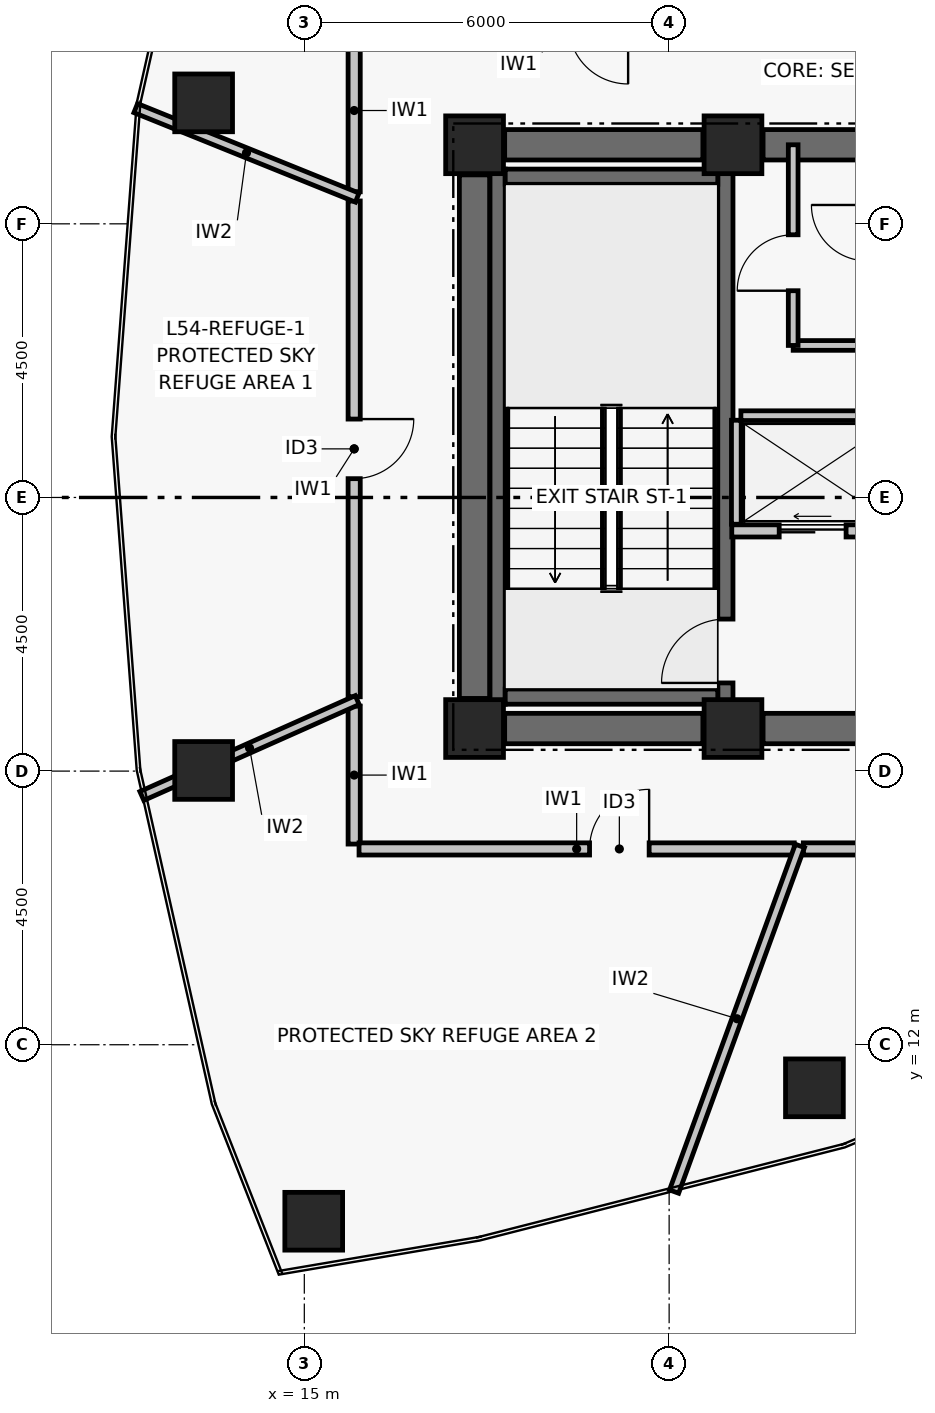
"""IFC4 building model, lengths in metres.
Left out: names, types, materials, properties, quantities, classifications, styles, units other than length and angle.
Written with IfcOpenShell. Run it as: python <this file> out.ifc"""

import sys

from ifc_helpers import new_model, si_unit, direction, frame, frame_2d, origin, origin_2d, place, context, subcontext, project, spatial, rectangle, hollow_rectangle, extrude, element, fill, save


model = new_model("IFC4")
c1 = context("Model", 3, precision=1e-05, world=origin(), true_north=direction((0.0, 1.0)))
c2 = subcontext(c1, "Body", "Model", "MODEL_VIEW")
j1 = project(units=[si_unit("LENGTHUNIT", "METRE"), si_unit("PLANEANGLEUNIT", "RADIAN")], contexts=[c1])
p1 = place(None, origin())
s1 = spatial("IfcSite", under=j1, at=p1, CompositionType="ELEMENT")
p2 = place(p1, origin())
s2 = spatial("IfcBuilding", under=s1, at=p2, CompositionType="ELEMENT")
p3 = place(p2, frame((0.0, 0.0, 213.84)))
s3 = spatial("IfcBuildingStorey", under=s2, at=p3, CompositionType="ELEMENT", Elevation=213.84)
for number, where, z_axis, x_axis in (
    (1, (17.8, 17.2, 0.0), (0.0, 0.0, 1.0), (1.0, 0.0, 0.0)),
    (2, (22.05, 17.2, 0.0), (0.0, 0.0, 1.0), (1.0, 0.0, 0.0)),
    (3, (17.8, 26.8, 0.0), (0.0, 0.0, 1.0), (1.0, 0.0, 0.0)),
    (4, (22.05, 26.8, 0.0), (0.0, 0.0, 1.0), (1.0, 0.0, 0.0)),
):
    element("IfcColumn", number, at=place(p3, frame(where, z_axis=z_axis, x_axis=x_axis)), inside=s3, PredefinedType="COLUMN", context=c2, shape_type="SweptSolid", body=[
        extrude(rectangle(XDim=0.95, YDim=0.95, at=origin_2d()), origin(), (0.0, 0.0, 1.0), 5.7),
    ])
p4 = place(p3, frame((18.295, 17.2, 0.0), z_axis=(0.0, 0.0, 1.0), x_axis=(1.0, 0.0, 0.0)))
e5 = element("IfcWall", 5, at=p4, inside=s3, PredefinedType="SHEAR", context=c2, shape_type="SweptSolid", body=[
    extrude(rectangle(XDim=3.26, YDim=0.5, at=frame_2d((1.63, 0.0))), origin(), (0.0, 0.0, 1.0), 5.48),
])
p5 = place(p3, frame((22.545, 17.2, 0.0), z_axis=(0.0, 0.0, 1.0), x_axis=(1.0, 0.0, 0.0)))
e6 = element("IfcWall", 6, at=p5, inside=s3, PredefinedType="SHEAR", context=c2, shape_type="SweptSolid", body=[
    extrude(rectangle(XDim=1.805, YDim=0.5, at=frame_2d((0.903, 0.0))), origin(), (0.0, 0.0, 1.0), 5.48),
])
p6 = place(p3, frame((18.295, 26.8, 0.0), z_axis=(0.0, 0.0, 1.0), x_axis=(1.0, 0.0, 0.0)))
e7 = element("IfcWall", 7, at=p6, inside=s3, PredefinedType="SHEAR", context=c2, shape_type="SweptSolid", body=[
    extrude(rectangle(XDim=3.26, YDim=0.5, at=frame_2d((1.63, 0.0))), origin(), (0.0, 0.0, 1.0), 5.48),
])
p7 = place(p3, frame((22.545, 26.8, 0.0), z_axis=(0.0, 0.0, 1.0), x_axis=(1.0, 0.0, 0.0)))
e8 = element("IfcWall", 8, at=p7, inside=s3, PredefinedType="SHEAR", context=c2, shape_type="SweptSolid", body=[
    extrude(rectangle(XDim=1.805, YDim=0.5, at=frame_2d((0.903, 0.0))), origin(), (0.0, 0.0, 1.0), 5.48),
])
p8 = place(p3, frame((17.8, 17.695, 0.0), z_axis=(0.0, 0.0, 1.0), x_axis=(0.0, 1.0, 0.0)))
e9 = element("IfcWall", 9, at=p8, inside=s3, PredefinedType="SHEAR", context=c2, shape_type="SweptSolid", body=[
    extrude(rectangle(XDim=8.61, YDim=0.5, at=frame_2d((4.305, 0.0))), origin(), (0.0, 0.0, 1.0), 5.48),
])
p9 = place(p3, frame((18.179, 17.6, 0.0), z_axis=(0.0, 0.0, 1.0), x_axis=(0.0, 1.0, 0.0)))
e10 = element("IfcWall", 10, at=p9, inside=s3, PredefinedType="SHEAR", context=c2, shape_type="SweptSolid", body=[
    extrude(rectangle(XDim=8.8, YDim=0.25, at=frame_2d((4.4, 0.0))), origin(), (0.0, 0.0, 1.0), 5.48),
])
p10 = place(p3, frame((21.925, 17.6, 0.0), z_axis=(0.0, 0.0, 1.0), x_axis=(0.0, 1.0, 0.0)))
e11 = element("IfcWall", 11, at=p10, inside=s3, PredefinedType="SHEAR", context=c2, shape_type="SweptSolid", body=[
    extrude(rectangle(XDim=8.8, YDim=0.25, at=frame_2d((4.4, 0.0))), origin(), (0.0, 0.0, 1.0), 5.48),
])
p11 = place(p10, frame((0.35, 0.0, 0.0)))
e12 = element("IfcOpeningElement", 12, at=p11, cuts=e11, PredefinedType="OPENING", context=c2, shape_type="SweptSolid", body=[
    extrude(rectangle(XDim=1.05, YDim=2.08, at=frame_2d((0.525, 1.04))), frame((0.0, 0.135, 0.0), z_axis=(0.0, -1.0, 0.0), x_axis=(1.0, 0.0, 0.0)), (0.0, 0.0, 1.0), 0.27),
])
for number, where, z_axis, x_axis in (
    (13, (18.304, 17.725, 0.0), (0.0, 0.0, 1.0), (1.0, 0.0, 0.0)),
    (14, (18.304, 26.275, 0.0), (0.0, 0.0, 1.0), (1.0, 0.0, 0.0)),
):
    element("IfcWall", number, at=place(p3, frame(where, z_axis=z_axis, x_axis=x_axis)), inside=s3, PredefinedType="SHEAR", context=c2, shape_type="SweptSolid", body=[
        extrude(rectangle(XDim=3.496, YDim=0.25, at=frame_2d((1.748, 0.0))), origin(), (0.0, 0.0, 1.0), 5.48),
    ])
for number, where, z_axis, x_axis in (
    (15, (13.344, 27.489, 0.0), (0.0, 0.0, 1.0), (1.0, 0.0, 0.0)),
    (16, (13.344, 16.511, 0.0), (0.0, 0.0, 1.0), (1.0, 0.0, 0.0)),
    (17, (15.155, 9.097, 0.0), (0.0, 0.0, 1.0), (1.0, 0.0, 0.0)),
    (18, (23.389, 11.292, 0.0), (0.0, 0.0, 1.0), (1.0, 0.0, 0.0)),
):
    element("IfcColumn", number, at=place(p3, frame(where, z_axis=z_axis, x_axis=x_axis)), inside=s3, PredefinedType="COLUMN", context=c2, shape_type="SweptSolid", body=[
        extrude(hollow_rectangle(XDim=0.95, YDim=0.95, WallThickness=0.04, at=origin_2d()), origin(), (0.0, 0.0, 1.0), 5.7),
    ])
p12 = place(p3, frame((22.03, 20.45, 0.0), z_axis=(0.0, 0.0, 1.0), x_axis=(1.0, 0.0, 0.0)))
e19 = element("IfcWall", 19, at=p12, inside=s3, PredefinedType="PARTITIONING", context=c2, shape_type="SweptSolid", body=[
    extrude(rectangle(XDim=2.8, YDim=0.2, at=frame_2d((1.4, 0.0))), origin(), (0.0, 0.0, 1.0), 5.48),
])
p13 = place(p12, frame((0.78, 0.0, 0.0)))
e20 = element("IfcOpeningElement", 20, at=p13, cuts=e19, PredefinedType="OPENING", context=c2, shape_type="SweptSolid", body=[
    extrude(rectangle(XDim=1.1, YDim=2.08, at=frame_2d((0.55, 1.04))), frame((0.0, 0.11, 0.0), z_axis=(0.0, -1.0, 0.0), x_axis=(1.0, 0.0, 0.0)), (0.0, 0.0, 1.0), 0.22),
])
p14 = place(p3, frame((22.105, 20.56, 0.0), z_axis=(0.0, 0.0, 1.0), x_axis=(0.0, 1.0, 0.0)))
e21 = element("IfcWall", 21, at=p14, inside=s3, PredefinedType="PARTITIONING", context=c2, shape_type="SweptSolid", body=[
    extrude(rectangle(XDim=1.71, YDim=0.16, at=frame_2d((0.855, 0.0))), origin(), (0.0, 0.0, 1.0), 5.48),
])
p15 = place(p3, frame((22.18, 22.345, 0.0), z_axis=(0.0, 0.0, 1.0), x_axis=(1.0, 0.0, 0.0)))
e22 = element("IfcWall", 22, at=p15, inside=s3, PredefinedType="PARTITIONING", context=c2, shape_type="SweptSolid", body=[
    extrude(rectangle(XDim=2.65, YDim=0.16, at=frame_2d((1.325, 0.0))), origin(), (0.0, 0.0, 1.0), 5.48),
])
p16 = place(p3, frame((23.04, 23.5, 0.0), z_axis=(0.0, 0.0, 1.0), x_axis=(1.0, 0.0, 0.0)))
e23 = element("IfcWall", 23, at=p16, inside=s3, PredefinedType="PARTITIONING", context=c2, shape_type="SweptSolid", body=[
    extrude(rectangle(XDim=1.7, YDim=0.16, at=frame_2d((0.85, 0.0))), origin(), (0.0, 0.0, 1.0), 5.48),
])
p17 = place(p3, frame((23.04, 23.5, 0.0), z_axis=(0.0, 0.0, 1.0), x_axis=(0.0, 1.0, 0.0)))
e24 = element("IfcWall", 24, at=p17, inside=s3, PredefinedType="PARTITIONING", context=c2, shape_type="SweptSolid", body=[
    extrude(rectangle(XDim=3.3, YDim=0.16, at=frame_2d((1.65, 0.0))), origin(), (0.0, 0.0, 1.0), 4.61),
])
p18 = place(p17, frame((0.9, 0.0, 0.0)))
e25 = element("IfcOpeningElement", 25, at=p18, cuts=e24, PredefinedType="OPENING", context=c2, shape_type="SweptSolid", body=[
    extrude(rectangle(XDim=0.92, YDim=2.05, at=frame_2d((0.46, 1.025))), frame((0.0, 0.09, 0.0), z_axis=(0.0, -1.0, 0.0), x_axis=(1.0, 0.0, 0.0)), (0.0, 0.0, 1.0), 0.18),
])
p19 = place(p3, frame((15.82, 25.876, 0.0), z_axis=(0.0, 0.0, 1.0), x_axis=(0.0, -1.0, 0.0)))
e26 = element("IfcWall", 26, at=p19, inside=s3, PredefinedType="PARTITIONING", context=c2, shape_type="SweptSolid", body=[
    extrude(rectangle(XDim=8.154, YDim=0.2, at=frame_2d((4.077, 0.0))), origin(), (0.0, 0.0, 1.0), 5.48),
])
p20 = place(p19, frame((3.587, 0.0, 0.0)))
e27 = element("IfcOpeningElement", 27, at=p20, cuts=e26, PredefinedType="OPENING", context=c2, shape_type="SweptSolid", body=[
    extrude(rectangle(XDim=0.98, YDim=2.06, at=frame_2d((0.49, 1.03))), frame((0.0, 0.11, 0.0), z_axis=(0.0, -1.0, 0.0), x_axis=(1.0, 0.0, 0.0)), (0.0, 0.0, 1.0), 0.22),
])
p21 = place(p3, frame((15.82, 17.569, 0.0), z_axis=(0.0, 0.0, 1.0), x_axis=(0.0, -1.0, 0.0)))
e28 = element("IfcWall", 28, at=p21, inside=s3, PredefinedType="PARTITIONING", context=c2, shape_type="SweptSolid", body=[
    extrude(rectangle(XDim=2.269, YDim=0.2, at=frame_2d((1.135, 0.0))), origin(), (0.0, 0.0, 1.0), 4.71),
])
p22 = place(p3, frame((15.9, 15.22, 0.0), z_axis=(0.0, 0.0, 1.0), x_axis=(1.0, 0.0, 0.0)))
e29 = element("IfcWall", 29, at=p22, inside=s3, PredefinedType="PARTITIONING", context=c2, shape_type="SweptSolid", body=[
    extrude(rectangle(XDim=7.158, YDim=0.2, at=frame_2d((3.579, 0.0))), origin(), (0.0, 0.0, 1.0), 4.71),
])
p23 = place(p22, frame((3.791, 0.0, 0.0)))
e30 = element("IfcOpeningElement", 30, at=p23, cuts=e29, PredefinedType="OPENING", context=c2, shape_type="SweptSolid", body=[
    extrude(rectangle(XDim=0.98, YDim=2.06, at=frame_2d((0.49, 1.03))), frame((0.0, 0.11, 0.0), z_axis=(0.0, -1.0, 0.0), x_axis=(1.0, 0.0, 0.0)), (0.0, 0.0, 1.0), 0.22),
])
p24 = place(p3, frame((23.207, 15.22, 0.0), z_axis=(0.0, 0.0, 1.0), x_axis=(1.0, 0.0, 0.0)))
e31 = element("IfcWall", 31, at=p24, inside=s3, PredefinedType="PARTITIONING", context=c2, shape_type="SweptSolid", body=[
    extrude(rectangle(XDim=5.622, YDim=0.2, at=frame_2d((2.811, 0.0))), origin(), (0.0, 0.0, 1.0), 5.48),
])
p25 = place(p24, frame((1.811, 0.0, 0.0)))
e32 = element("IfcOpeningElement", 32, at=p25, cuts=e31, PredefinedType="OPENING", context=c2, shape_type="SweptSolid", body=[
    extrude(rectangle(XDim=0.98, YDim=2.06, at=frame_2d((0.49, 1.03))), frame((0.0, 0.11, 0.0), z_axis=(0.0, -1.0, 0.0), x_axis=(1.0, 0.0, 0.0)), (0.0, 0.0, 1.0), 0.22),
])
p26 = place(p3, frame((15.82, 28.7, 0.0), z_axis=(0.0, 0.0, 1.0), x_axis=(0.0, -1.0, 0.0)))
e33 = element("IfcWall", 33, at=p26, inside=s3, PredefinedType="PARTITIONING", context=c2, shape_type="SweptSolid", body=[
    extrude(rectangle(XDim=2.673, YDim=0.2, at=frame_2d((1.336, 0.0))), origin(), (0.0, 0.0, 1.0), 4.71),
])
p27 = place(p3, frame((15.87, 25.931, 0.0), z_axis=(0.0, 0.0, 1.0), x_axis=(-0.927185393296, 0.374602784905, 0.0)))
e34 = element("IfcWall", 34, at=p27, inside=s3, PredefinedType="PARTITIONING", context=c2, shape_type="SweptSolid", body=[
    extrude(rectangle(XDim=3.929, YDim=0.16, at=frame_2d((1.964, 0.0))), origin(), (0.0, 0.0, 1.0), 4.91),
])
p28 = place(p3, frame((15.87, 17.668, 0.0), z_axis=(0.0, 0.0, 1.0), x_axis=(-0.913554296234, -0.406716790693, 0.0)))
e35 = element("IfcWall", 35, at=p28, inside=s3, PredefinedType="PARTITIONING", context=c2, shape_type="SweptSolid", body=[
    extrude(rectangle(XDim=3.877, YDim=0.16, at=frame_2d((1.938, 0.0))), origin(), (0.0, 0.0, 1.0), 4.71),
])
p29 = place(p3, frame((23.15, 15.27, 0.0), z_axis=(0.0, 0.0, 1.0), x_axis=(-0.342018471851, -0.939693229151, 0.0)))
e36 = element("IfcWall", 36, at=p29, inside=s3, PredefinedType="PARTITIONING", context=c2, shape_type="SweptSolid", body=[
    extrude(rectangle(XDim=6.05, YDim=0.16, at=frame_2d((3.025, 0.0))), origin(), (0.0, 0.0, 1.0), 4.71),
])
p30 = place(p11, origin())
e37 = element("IfcDoor", 37, at=p30, inside=s3, OperationType="SINGLE_SWING_LEFT", PredefinedType="DOOR", context=c2, shape_type="SweptSolid", body=[
    extrude(rectangle(XDim=1.05, YDim=2.08, at=frame_2d((0.525, 1.04))), frame((0.0, 0.025, 0.0), z_axis=(0.0, -1.0, 0.0), x_axis=(1.0, 0.0, 0.0)), (0.0, 0.0, 1.0), 0.05),
])
fill(e12, e37)
p31 = place(p13, origin())
e38 = element("IfcDoor", 38, at=p31, inside=s3, OperationType="DOUBLE_DOOR_SLIDING", PredefinedType="DOOR", context=c2, shape_type="SweptSolid", body=[
    extrude(rectangle(XDim=1.1, YDim=2.08, at=frame_2d((0.55, 1.04))), frame((0.0, 0.025, 0.0), z_axis=(0.0, -1.0, 0.0), x_axis=(1.0, 0.0, 0.0)), (0.0, 0.0, 1.0), 0.05),
])
fill(e20, e38)
p32 = place(p18, origin())
e39 = element("IfcDoor", 39, at=p32, inside=s3, OperationType="SINGLE_SWING_LEFT", PredefinedType="DOOR", context=c2, shape_type="SweptSolid", body=[
    extrude(rectangle(XDim=0.92, YDim=2.05, at=frame_2d((0.46, 1.025))), frame((0.0, 0.025, 0.0), z_axis=(0.0, -1.0, 0.0), x_axis=(1.0, 0.0, 0.0)), (0.0, 0.0, 1.0), 0.05),
])
fill(e25, e39)
p33 = place(p20, origin())
e40 = element("IfcDoor", 40, at=p33, inside=s3, OperationType="SINGLE_SWING_LEFT", PredefinedType="DOOR", context=c2, shape_type="SweptSolid", body=[
    extrude(rectangle(XDim=0.98, YDim=2.06, at=frame_2d((0.49, 1.03))), frame((0.0, 0.025, 0.0), z_axis=(0.0, -1.0, 0.0), x_axis=(1.0, 0.0, 0.0)), (0.0, 0.0, 1.0), 0.05),
])
fill(e27, e40)
p34 = place(p23, origin())
e41 = element("IfcDoor", 41, at=p34, inside=s3, OperationType="SINGLE_SWING_RIGHT", PredefinedType="DOOR", context=c2, shape_type="SweptSolid", body=[
    extrude(rectangle(XDim=0.98, YDim=2.06, at=frame_2d((0.49, 1.03))), frame((0.0, 0.025, 0.0), z_axis=(0.0, -1.0, 0.0), x_axis=(1.0, 0.0, 0.0)), (0.0, 0.0, 1.0), 0.05),
])
fill(e30, e41)
save(model, sys.argv[1])
